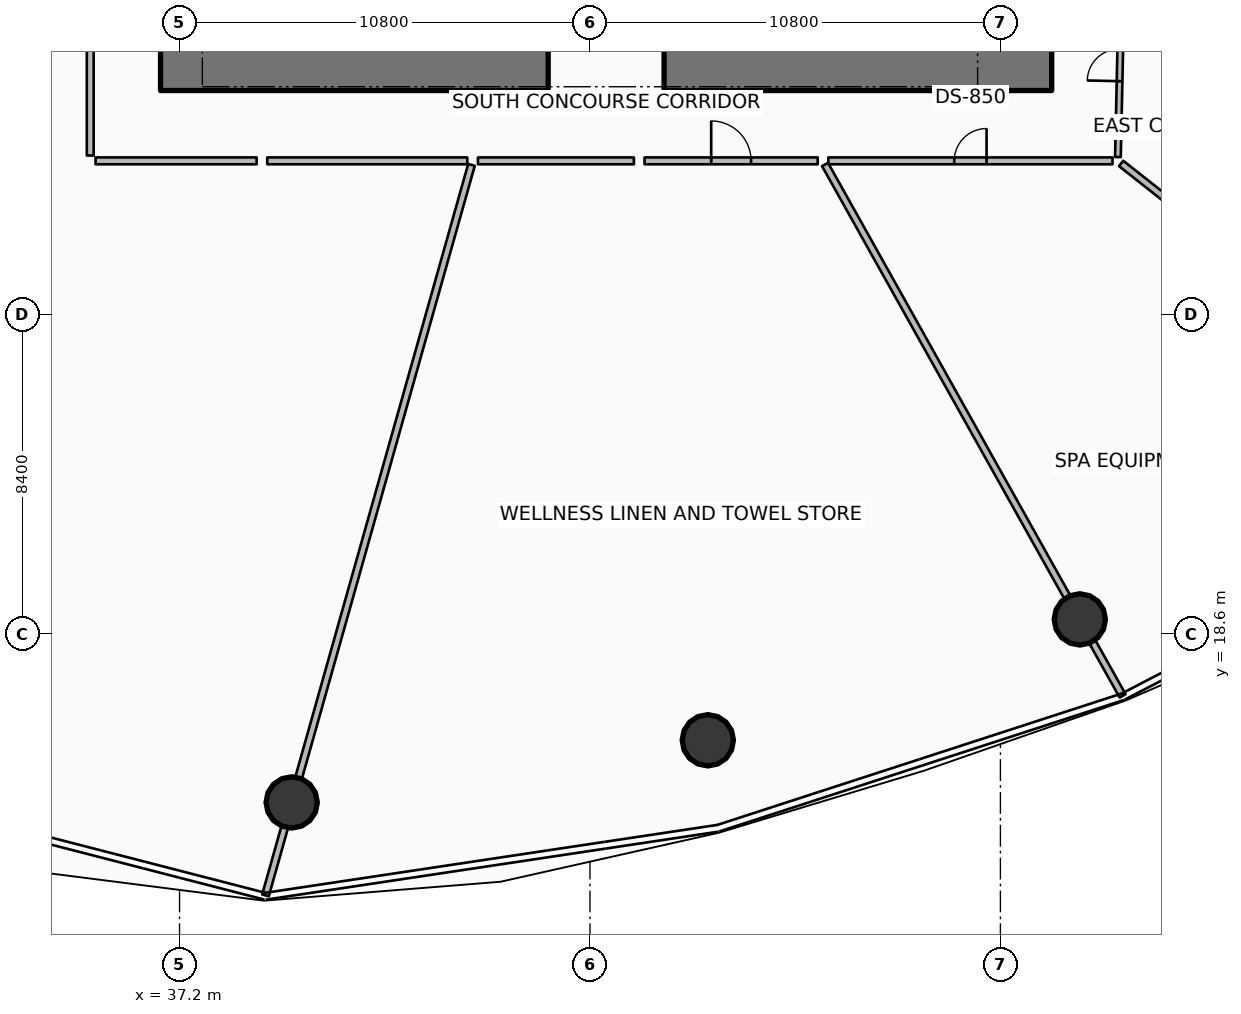
"""IFC4 building model, lengths in metres.
Left out: names, types, materials, properties, quantities, classifications, styles, units other than length and angle.
Written with IfcOpenShell. Run it as: python <this file> out.ifc"""

import sys

from ifc_helpers import new_model, si_unit, direction, frame, frame_2d, origin, origin_2d, place, context, subcontext, project, spatial, rectangle, circle, extrude, element, fill, save


model = new_model("IFC4")
c1 = context("Model", 3, precision=1e-05, world=origin(), true_north=direction((0.0, 1.0)))
c2 = subcontext(c1, "Body", "Model", "MODEL_VIEW")
j1 = project(units=[si_unit("LENGTHUNIT", "METRE"), si_unit("PLANEANGLEUNIT", "RADIAN")], contexts=[c1])
p1 = place(None, origin())
s1 = spatial("IfcSite", under=j1, at=p1, CompositionType="ELEMENT")
p2 = place(p1, origin())
s2 = spatial("IfcBuilding", under=s1, at=p2, CompositionType="ELEMENT")
p3 = place(p2, frame((0.0, 0.0, 12.0)))
s3 = spatial("IfcBuildingStorey", under=s2, at=p3, CompositionType="ELEMENT", Elevation=12.0)
for number, where, z_axis, x_axis in (
    (1, (36.7, 33.45, 0.0), (0.0, 0.0, 1.0), (1.0, 0.0, 0.0)),
    (2, (49.95, 33.45, 0.0), (0.0, 0.0, 1.0), (1.0, 0.0, 0.0)),
):
    element("IfcWall", number, at=place(p3, frame(where, z_axis=z_axis, x_axis=x_axis)), inside=s3, PredefinedType="SHEAR", context=c2, shape_type="SweptSolid", body=[
        extrude(rectangle(XDim=10.2, YDim=1.1, at=frame_2d((5.1, 0.0))), origin(), (0.0, 0.0, 1.0), 4.8),
    ])
for number, where, z_axis, x_axis in (
    (3, (40.151, 14.169, 0.0), (0.0, 0.0, 1.0), (1.0, 0.0, 0.0)),
    (4, (51.101, 15.804, 0.0), (0.0, 0.0, 1.0), (1.0, 0.0, 0.0)),
    (5, (60.889, 18.984, 0.0), (0.0, 0.0, 1.0), (1.0, 0.0, 0.0)),
):
    element("IfcColumn", number, at=place(p3, frame(where, z_axis=z_axis, x_axis=x_axis)), inside=s3, PredefinedType="COLUMN", context=c2, shape_type="SweptSolid", body=[
        extrude(circle(Radius=0.675, at=origin_2d()), origin(), (0.0, 0.0, 1.0), 4.48),
    ])
p4 = place(p3, frame((34.85, 34.496, 0.0), z_axis=(0.0, 0.0, 1.0), x_axis=(0.0, -1.0, 0.0)))
e6 = element("IfcWall", 6, at=p4, inside=s3, PredefinedType="PARTITIONING", context=c2, shape_type="SweptSolid", body=[
    extrude(rectangle(XDim=3.306, YDim=0.18, at=frame_2d((1.653, 0.0))), origin(), (0.0, 0.0, 1.0), 3.693),
])
p5 = place(p3, frame((34.99, 31.05, 0.0), z_axis=(0.0, 0.0, 1.0), x_axis=(1.0, 0.0, 0.0)))
e7 = element("IfcWall", 7, at=p5, inside=s3, PredefinedType="PARTITIONING", context=c2, shape_type="SweptSolid", body=[
    extrude(rectangle(XDim=4.238, YDim=0.18, at=frame_2d((2.119, 0.0))), origin(), (0.0, 0.0, 1.0), 3.693),
])
p6 = place(p3, frame((39.508, 31.05, 0.0), z_axis=(0.0, 0.0, 1.0), x_axis=(1.0, 0.0, 0.0)))
e8 = element("IfcWall", 8, at=p6, inside=s3, PredefinedType="PARTITIONING", context=c2, shape_type="SweptSolid", body=[
    extrude(rectangle(XDim=5.264, YDim=0.18, at=frame_2d((2.632, 0.0))), origin(), (0.0, 0.0, 1.0), 3.693),
])
p7 = place(p3, frame((44.882, 30.944, 0.0), z_axis=(0.0, 0.0, 1.0), x_axis=(-0.271438678553, -0.962455736014, 0.0)))
e9 = element("IfcWall", 9, at=p7, inside=s3, PredefinedType="PARTITIONING", context=c2, shape_type="SweptSolid", body=[
    extrude(rectangle(XDim=19.971, YDim=0.18, at=frame_2d((9.985, 0.0))), origin(), (0.0, 0.0, 1.0), 3.693),
])
p8 = place(p3, frame((45.052, 31.05, 0.0), z_axis=(0.0, 0.0, 1.0), x_axis=(1.0, 0.0, 0.0)))
e10 = element("IfcWall", 10, at=p8, inside=s3, PredefinedType="PARTITIONING", context=c2, shape_type="SweptSolid", body=[
    extrude(rectangle(XDim=4.104, YDim=0.18, at=frame_2d((2.052, 0.0))), origin(), (0.0, 0.0, 1.0), 3.693),
])
p9 = place(p3, frame((49.436, 31.05, 0.0), z_axis=(0.0, 0.0, 1.0), x_axis=(1.0, 0.0, 0.0)))
e11 = element("IfcWall", 11, at=p9, inside=s3, PredefinedType="PARTITIONING", context=c2, shape_type="SweptSolid", body=[
    extrude(rectangle(XDim=4.556, YDim=0.18, at=frame_2d((2.278, 0.0))), origin(), (0.0, 0.0, 1.0), 3.693),
])
p10 = place(p9, frame((1.753, 0.0, 0.0)))
e12 = element("IfcOpeningElement", 12, at=p10, cuts=e11, PredefinedType="OPENING", context=c2, shape_type="SweptSolid", body=[
    extrude(rectangle(XDim=1.05, YDim=2.1, at=frame_2d((0.525, 1.05))), frame((0.0, 0.1, 0.0), z_axis=(0.0, -1.0, 0.0), x_axis=(1.0, 0.0, 0.0)), (0.0, 0.0, 1.0), 0.2),
])
p11 = place(p3, frame((54.186, 30.954, 0.0), z_axis=(0.0, 0.0, 1.0), x_axis=(0.48862053439, -0.872496403071, 0.0)))
e13 = element("IfcWall", 13, at=p11, inside=s3, PredefinedType="PARTITIONING", context=c2, shape_type="SweptSolid", body=[
    extrude(rectangle(XDim=16.024, YDim=0.18, at=frame_2d((8.012, 0.0))), origin(), (0.0, 0.0, 1.0), 3.693),
])
p12 = place(p3, frame((54.272, 31.05, 0.0), z_axis=(0.0, 0.0, 1.0), x_axis=(1.0, 0.0, 0.0)))
e14 = element("IfcWall", 14, at=p12, inside=s3, PredefinedType="PARTITIONING", context=c2, shape_type="SweptSolid", body=[
    extrude(rectangle(XDim=7.478, YDim=0.18, at=frame_2d((3.739, 0.0))), origin(), (0.0, 0.0, 1.0), 3.693),
])
p13 = place(p12, frame((3.314, 0.0, 0.0)))
e15 = element("IfcOpeningElement", 15, at=p13, cuts=e14, PredefinedType="OPENING", context=c2, shape_type="SweptSolid", body=[
    extrude(rectangle(XDim=0.85, YDim=2.06, at=frame_2d((0.425, 1.03))), frame((0.0, 0.1, 0.0), z_axis=(0.0, -1.0, 0.0), x_axis=(1.0, 0.0, 0.0)), (0.0, 0.0, 1.0), 0.2),
])
p14 = place(p3, frame((61.976, 30.982, 0.0), z_axis=(0.0, 0.0, 1.0), x_axis=(0.785315783489, -0.619095404766, 0.0)))
e16 = element("IfcWall", 16, at=p14, inside=s3, PredefinedType="PARTITIONING", context=c2, shape_type="SweptSolid", body=[
    extrude(rectangle(XDim=13.661, YDim=0.18, at=frame_2d((6.831, 0.0))), origin(), (0.0, 0.0, 1.0), 3.693),
])
p15 = place(p3, frame((61.892, 31.15, 0.0), z_axis=(0.0, 0.0, 1.0), x_axis=(0.021928973177, 0.999759531155, 0.0)))
e17 = element("IfcWall", 17, at=p15, inside=s3, PredefinedType="PARTITIONING", context=c2, shape_type="SweptSolid", body=[
    extrude(rectangle(XDim=4.843, YDim=0.15, at=frame_2d((2.421, 0.0))), origin(), (0.0, 0.0, 1.0), 3.693),
])
p16 = place(p15, frame((1.997, 0.0, 0.0)))
e18 = element("IfcOpeningElement", 18, at=p16, cuts=e17, PredefinedType="OPENING", context=c2, shape_type="SweptSolid", body=[
    extrude(rectangle(XDim=0.85, YDim=2.06, at=frame_2d((0.425, 1.03))), frame((0.0, 0.085, 0.0), z_axis=(0.0, -1.0, 0.0), x_axis=(1.0, 0.0, 0.0)), (0.0, 0.0, 1.0), 0.17),
])
p17 = place(p3, frame((62.074, 36.041, 0.0), z_axis=(0.0, 0.0, 1.0), x_axis=(0.920841540816, -0.38993699069, 0.0)))
e19 = element("IfcWall", 19, at=p17, inside=s3, PredefinedType="PARTITIONING", context=c2, shape_type="SweptSolid", body=[
    extrude(rectangle(XDim=5.443, YDim=0.15, at=frame_2d((2.722, 0.0))), origin(), (0.0, 0.0, 1.0), 3.92),
])
p18 = place(p3, frame((62.106, 38.022, 0.0), z_axis=(0.0, 0.0, 1.0), x_axis=(0.962455233657, -0.271440459782, 0.0)))
e20 = element("IfcWall", 20, at=p18, inside=s3, PredefinedType="PARTITIONING", context=c2, shape_type="SweptSolid", body=[
    extrude(rectangle(XDim=19.716, YDim=0.18, at=frame_2d((9.858, 0.0))), origin(), (0.0, 0.0, 1.0), 3.693),
])
p19 = place(p10, origin())
e21 = element("IfcDoor", 21, at=p19, inside=s3, OperationType="SINGLE_SWING_LEFT", PredefinedType="DOOR", context=c2, shape_type="SweptSolid", body=[
    extrude(rectangle(XDim=1.05, YDim=2.1, at=frame_2d((0.525, 1.05))), frame((0.0, 0.025, 0.0), z_axis=(0.0, -1.0, 0.0), x_axis=(1.0, 0.0, 0.0)), (0.0, 0.0, 1.0), 0.05),
])
fill(e12, e21)
p20 = place(p13, origin())
e22 = element("IfcDoor", 22, at=p20, inside=s3, OperationType="SINGLE_SWING_RIGHT", PredefinedType="DOOR", context=c2, shape_type="SweptSolid", body=[
    extrude(rectangle(XDim=0.85, YDim=2.06, at=frame_2d((0.425, 1.03))), frame((0.0, 0.025, 0.0), z_axis=(0.0, -1.0, 0.0), x_axis=(1.0, 0.0, 0.0)), (0.0, 0.0, 1.0), 0.05),
])
fill(e15, e22)
p21 = place(p16, origin())
e23 = element("IfcDoor", 23, at=p21, inside=s3, OperationType="SINGLE_SWING_LEFT", PredefinedType="DOOR", context=c2, shape_type="SweptSolid", body=[
    extrude(rectangle(XDim=0.85, YDim=2.06, at=frame_2d((0.425, 1.03))), frame((0.0, 0.025, 0.0), z_axis=(0.0, -1.0, 0.0), x_axis=(1.0, 0.0, 0.0)), (0.0, 0.0, 1.0), 0.05),
])
fill(e18, e23)
save(model, sys.argv[1])
